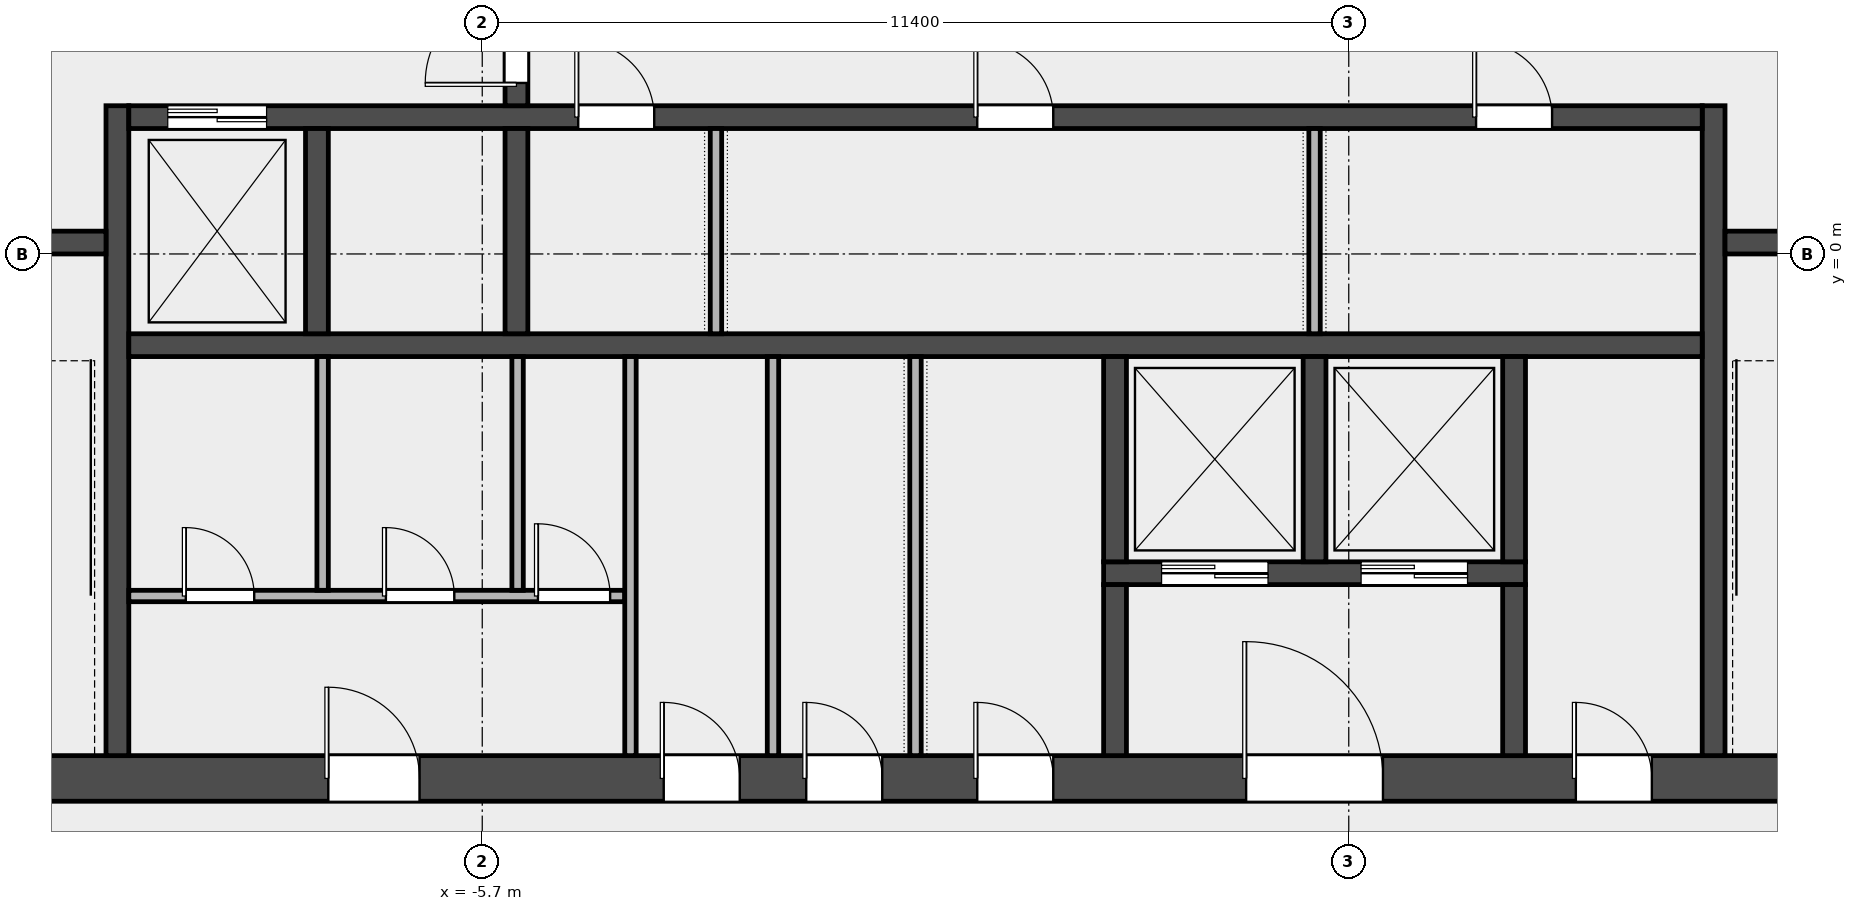
"""IFC4 building model, lengths in metres.
Left out: names, types, materials, properties, quantities, classifications, styles, units other than length and angle.
Written with IfcOpenShell. Run it as: python <this file> out.ifc"""

import sys

from ifc_helpers import new_model, si_unit, direction, frame, frame_2d, origin, place, context, subcontext, project, spatial, rectangle, extrude, element, fill, save


model = new_model("IFC4")
c1 = context("Model", 3, precision=1e-05, world=origin(), true_north=direction((0.0, 1.0)))
c2 = subcontext(c1, "Body", "Model", "MODEL_VIEW")
j1 = project(units=[si_unit("LENGTHUNIT", "METRE"), si_unit("PLANEANGLEUNIT", "RADIAN")], contexts=[c1])
p1 = place(None, origin())
s1 = spatial("IfcSite", under=j1, at=p1, CompositionType="ELEMENT")
p2 = place(p1, origin())
s2 = spatial("IfcBuilding", under=s1, at=p2, CompositionType="ELEMENT")
p3 = place(p2, frame((0.0, 0.0, 349.4)))
s3 = spatial("IfcBuildingStorey", under=s2, at=p3, CompositionType="ELEMENT", Elevation=349.4)
p4 = place(p3, frame((-14.4, -6.9, 0.0), z_axis=(0.0, 0.0, 1.0), x_axis=(1.0, 0.0, 0.0)))
e1 = element("IfcWall", 1, at=p4, inside=s3, PredefinedType="SHEAR", context=c2, shape_type="SweptSolid", body=[
    extrude(rectangle(XDim=28.8, YDim=0.6, at=frame_2d((14.4, 0.0))), origin(), (0.0, 0.0, 1.0), 3.7),
])
p5 = place(p4, frame((6.675, 0.0, 0.0)))
e2 = element("IfcOpeningElement", 2, at=p5, cuts=e1, PredefinedType="OPENING", context=c2, shape_type="SweptSolid", body=[
    extrude(rectangle(XDim=1.2, YDim=2.1, at=frame_2d((0.6, 1.05))), frame((0.0, 0.312, 0.0), z_axis=(0.0, -1.0, 0.0), x_axis=(1.0, 0.0, 0.0)), (0.0, 0.0, 1.0), 0.624),
])
p6 = place(p4, frame((11.087, 0.0, 0.0)))
e3 = element("IfcOpeningElement", 3, at=p6, cuts=e1, PredefinedType="OPENING", context=c2, shape_type="SweptSolid", body=[
    extrude(rectangle(XDim=1.0, YDim=2.1, at=frame_2d((0.5, 1.05))), frame((0.0, 0.312, 0.0), z_axis=(0.0, -1.0, 0.0), x_axis=(1.0, 0.0, 0.0)), (0.0, 0.0, 1.0), 0.624),
])
p7 = place(p4, frame((12.962, 0.0, 0.0)))
e4 = element("IfcOpeningElement", 4, at=p7, cuts=e1, PredefinedType="OPENING", context=c2, shape_type="SweptSolid", body=[
    extrude(rectangle(XDim=1.0, YDim=2.1, at=frame_2d((0.5, 1.05))), frame((0.0, 0.312, 0.0), z_axis=(0.0, -1.0, 0.0), x_axis=(1.0, 0.0, 0.0)), (0.0, 0.0, 1.0), 0.624),
])
p8 = place(p4, frame((15.212, 0.0, 0.0)))
e5 = element("IfcOpeningElement", 5, at=p8, cuts=e1, PredefinedType="OPENING", context=c2, shape_type="SweptSolid", body=[
    extrude(rectangle(XDim=1.0, YDim=2.1, at=frame_2d((0.5, 1.05))), frame((0.0, 0.312, 0.0), z_axis=(0.0, -1.0, 0.0), x_axis=(1.0, 0.0, 0.0)), (0.0, 0.0, 1.0), 0.624),
])
p9 = place(p4, frame((18.75, 0.0, 0.0)))
e6 = element("IfcOpeningElement", 6, at=p9, cuts=e1, PredefinedType="OPENING", context=c2, shape_type="SweptSolid", body=[
    extrude(rectangle(XDim=1.8, YDim=2.1, at=frame_2d((0.9, 1.05))), frame((0.0, 0.312, 0.0), z_axis=(0.0, -1.0, 0.0), x_axis=(1.0, 0.0, 0.0)), (0.0, 0.0, 1.0), 0.624),
])
p10 = place(p4, frame((23.087, 0.0, 0.0)))
e7 = element("IfcOpeningElement", 7, at=p10, cuts=e1, PredefinedType="OPENING", context=c2, shape_type="SweptSolid", body=[
    extrude(rectangle(XDim=1.0, YDim=2.1, at=frame_2d((0.5, 1.05))), frame((0.0, 0.312, 0.0), z_axis=(0.0, -1.0, 0.0), x_axis=(1.0, 0.0, 0.0)), (0.0, 0.0, 1.0), 0.624),
])
for number, where, z_axis, x_axis in (
    (8, (-10.5, -6.6, 0.0), (0.0, 0.0, 1.0), (0.0, 1.0, 0.0)),
    (9, (10.5, -6.6, 0.0), (0.0, 0.0, 1.0), (0.0, 1.0, 0.0)),
):
    element("IfcWall", number, at=place(p3, frame(where, z_axis=z_axis, x_axis=x_axis)), inside=s3, PredefinedType="SHEAR", context=c2, shape_type="SweptSolid", body=[
        extrude(rectangle(XDim=8.55, YDim=0.3, at=frame_2d((4.275, 0.0))), origin(), (0.0, 0.0, 1.0), 3.7),
    ])
p11 = place(p3, frame((-13.8, 0.15, 0.0), z_axis=(0.0, 0.0, 1.0), x_axis=(1.0, 0.0, 0.0)))
e10 = element("IfcWall", 10, at=p11, inside=s3, PredefinedType="SOLIDWALL", context=c2, shape_type="SweptSolid", body=[
    extrude(rectangle(XDim=3.15, YDim=0.3, at=frame_2d((1.575, 0.0))), origin(), (0.0, 0.0, 1.0), 3.7),
])
p12 = place(p11, frame((0.975, 0.0, 0.0)))
e11 = element("IfcOpeningElement", 11, at=p12, cuts=e10, PredefinedType="OPENING", context=c2, shape_type="SweptSolid", body=[
    extrude(rectangle(XDim=1.1, YDim=2.1, at=frame_2d((0.55, 1.05))), frame((0.0, 0.162, 0.0), z_axis=(0.0, -1.0, 0.0), x_axis=(1.0, 0.0, 0.0)), (0.0, 0.0, 1.0), 0.324),
])
p13 = place(p3, frame((10.65, 0.15, 0.0), z_axis=(0.0, 0.0, 1.0), x_axis=(1.0, 0.0, 0.0)))
e12 = element("IfcWall", 12, at=p13, inside=s3, PredefinedType="SOLIDWALL", context=c2, shape_type="SweptSolid", body=[
    extrude(rectangle(XDim=3.15, YDim=0.3, at=frame_2d((1.575, 0.0))), origin(), (0.0, 0.0, 1.0), 3.7),
])
p14 = place(p13, frame((1.025, 0.0, 0.0)))
e13 = element("IfcOpeningElement", 13, at=p14, cuts=e12, PredefinedType="OPENING", context=c2, shape_type="SweptSolid", body=[
    extrude(rectangle(XDim=1.1, YDim=2.1, at=frame_2d((0.55, 1.05))), frame((0.0, 0.162, 0.0), z_axis=(0.0, -1.0, 0.0), x_axis=(1.0, 0.0, 0.0)), (0.0, 0.0, 1.0), 0.324),
])
p15 = place(p3, frame((-10.35, -1.2, 0.0), z_axis=(0.0, 0.0, 1.0), x_axis=(1.0, 0.0, 0.0)))
e14 = element("IfcWall", 14, at=p15, inside=s3, PredefinedType="SOLIDWALL", context=c2, shape_type="SweptSolid", body=[
    extrude(rectangle(XDim=20.7, YDim=0.3, at=frame_2d((10.35, 0.0))), origin(), (0.0, 0.0, 1.0), 3.7),
])
p16 = place(p3, frame((-10.35, 1.8, 0.0), z_axis=(0.0, 0.0, 1.0), x_axis=(1.0, 0.0, 0.0)))
e15 = element("IfcWall", 15, at=p16, inside=s3, PredefinedType="SOLIDWALL", context=c2, shape_type="SweptSolid", body=[
    extrude(rectangle(XDim=20.7, YDim=0.3, at=frame_2d((10.35, 0.0))), origin(), (0.0, 0.0, 1.0), 3.7),
])
p17 = place(p16, frame((0.512, 0.0, 0.0)))
e16 = element("IfcOpeningElement", 16, at=p17, cuts=e15, PredefinedType="OPENING", context=c2, shape_type="SweptSolid", body=[
    extrude(rectangle(XDim=1.3, YDim=2.1, at=frame_2d((0.65, 1.05))), frame((0.0, 0.162, 0.0), z_axis=(0.0, -1.0, 0.0), x_axis=(1.0, 0.0, 0.0)), (0.0, 0.0, 1.0), 0.324),
])
p18 = place(p16, frame((5.913, 0.0, 0.0)))
e17 = element("IfcOpeningElement", 17, at=p18, cuts=e15, PredefinedType="OPENING", context=c2, shape_type="SweptSolid", body=[
    extrude(rectangle(XDim=1.0, YDim=2.1, at=frame_2d((0.5, 1.05))), frame((0.0, 0.162, 0.0), z_axis=(0.0, -1.0, 0.0), x_axis=(1.0, 0.0, 0.0)), (0.0, 0.0, 1.0), 0.324),
])
p19 = place(p16, frame((11.163, 0.0, 0.0)))
e18 = element("IfcOpeningElement", 18, at=p19, cuts=e15, PredefinedType="OPENING", context=c2, shape_type="SweptSolid", body=[
    extrude(rectangle(XDim=1.0, YDim=2.1, at=frame_2d((0.5, 1.05))), frame((0.0, 0.162, 0.0), z_axis=(0.0, -1.0, 0.0), x_axis=(1.0, 0.0, 0.0)), (0.0, 0.0, 1.0), 0.324),
])
p20 = place(p16, frame((17.725, 0.0, 0.0)))
e19 = element("IfcOpeningElement", 19, at=p20, cuts=e15, PredefinedType="OPENING", context=c2, shape_type="SweptSolid", body=[
    extrude(rectangle(XDim=1.0, YDim=2.1, at=frame_2d((0.5, 1.05))), frame((0.0, 0.162, 0.0), z_axis=(0.0, -1.0, 0.0), x_axis=(1.0, 0.0, 0.0)), (0.0, 0.0, 1.0), 0.324),
])
for number, where, z_axis, x_axis in (
    (20, (-7.875, -1.05, 0.0), (0.0, 0.0, 1.0), (0.0, 1.0, 0.0)),
    (21, (-5.25, -1.05, 0.0), (0.0, 0.0, 1.0), (0.0, 1.0, 0.0)),
):
    element("IfcWall", number, at=place(p3, frame(where, z_axis=z_axis, x_axis=x_axis)), inside=s3, PredefinedType="SOLIDWALL", context=c2, shape_type="SweptSolid", body=[
        extrude(rectangle(XDim=2.7, YDim=0.3, at=frame_2d((1.35, 0.0))), origin(), (0.0, 0.0, 1.0), 3.7),
    ])
p21 = place(p3, frame((-5.25, 1.95, 0.0), z_axis=(0.0, 0.0, 1.0), x_axis=(0.0, 1.0, 0.0)))
e22 = element("IfcWall", 22, at=p21, inside=s3, PredefinedType="SOLIDWALL", context=c2, shape_type="SweptSolid", body=[
    extrude(rectangle(XDim=3.3, YDim=0.3, at=frame_2d((1.65, 0.0))), origin(), (0.0, 0.0, 1.0), 3.7),
])
p22 = place(p21, frame((0.3, 0.0, 0.0)))
e23 = element("IfcOpeningElement", 23, at=p22, cuts=e22, PredefinedType="OPENING", context=c2, shape_type="SweptSolid", body=[
    extrude(rectangle(XDim=1.2, YDim=2.1, at=frame_2d((0.6, 1.05))), frame((0.0, 0.162, 0.0), z_axis=(0.0, -1.0, 0.0), x_axis=(1.0, 0.0, 0.0)), (0.0, 0.0, 1.0), 0.324),
])
p23 = place(p21, frame((1.8, 0.0, 0.0)))
e24 = element("IfcOpeningElement", 24, at=p23, cuts=e22, PredefinedType="OPENING", context=c2, shape_type="SweptSolid", body=[
    extrude(rectangle(XDim=1.2, YDim=2.1, at=frame_2d((0.6, 1.05))), frame((0.0, 0.162, 0.0), z_axis=(0.0, -1.0, 0.0), x_axis=(1.0, 0.0, 0.0)), (0.0, 0.0, 1.0), 0.324),
])
p24 = place(p3, frame((2.475, -4.2, 0.0), z_axis=(0.0, 0.0, 1.0), x_axis=(1.0, 0.0, 0.0)))
e25 = element("IfcWall", 25, at=p24, inside=s3, PredefinedType="SOLIDWALL", context=c2, shape_type="SweptSolid", body=[
    extrude(rectangle(XDim=5.55, YDim=0.3, at=frame_2d((2.775, 0.0))), origin(), (0.0, 0.0, 1.0), 3.7),
])
p25 = place(p24, frame((0.762, 0.0, 0.0)))
e26 = element("IfcOpeningElement", 26, at=p25, cuts=e25, PredefinedType="OPENING", context=c2, shape_type="SweptSolid", body=[
    extrude(rectangle(XDim=1.4, YDim=2.1, at=frame_2d((0.7, 1.05))), frame((0.0, 0.162, 0.0), z_axis=(0.0, -1.0, 0.0), x_axis=(1.0, 0.0, 0.0)), (0.0, 0.0, 1.0), 0.324),
])
p26 = place(p24, frame((3.387, 0.0, 0.0)))
e27 = element("IfcOpeningElement", 27, at=p26, cuts=e25, PredefinedType="OPENING", context=c2, shape_type="SweptSolid", body=[
    extrude(rectangle(XDim=1.4, YDim=2.1, at=frame_2d((0.7, 1.05))), frame((0.0, 0.162, 0.0), z_axis=(0.0, -1.0, 0.0), x_axis=(1.0, 0.0, 0.0)), (0.0, 0.0, 1.0), 0.324),
])
p27 = place(p3, frame((2.625, -4.05, 0.0), z_axis=(0.0, 0.0, 1.0), x_axis=(0.0, 1.0, 0.0)))
e28 = element("IfcWall", 28, at=p27, inside=s3, PredefinedType="SOLIDWALL", context=c2, shape_type="SweptSolid", body=[
    extrude(rectangle(XDim=2.7, YDim=0.3, at=frame_2d((1.35, 0.0))), origin(), (0.0, 0.0, 1.0), 3.7),
])
p28 = place(p3, frame((2.625, -6.6, 0.0), z_axis=(0.0, 0.0, 1.0), x_axis=(0.0, 1.0, 0.0)))
e29 = element("IfcWall", 29, at=p28, inside=s3, PredefinedType="SOLIDWALL", context=c2, shape_type="SweptSolid", body=[
    extrude(rectangle(XDim=2.25, YDim=0.3, at=frame_2d((1.125, 0.0))), origin(), (0.0, 0.0, 1.0), 3.7),
])
for number, where, z_axis, x_axis in (
    (30, (5.25, -4.05, 0.0), (0.0, 0.0, 1.0), (0.0, 1.0, 0.0)),
    (31, (7.875, -4.05, 0.0), (0.0, 0.0, 1.0), (0.0, 1.0, 0.0)),
):
    element("IfcWall", number, at=place(p3, frame(where, z_axis=z_axis, x_axis=x_axis)), inside=s3, PredefinedType="SOLIDWALL", context=c2, shape_type="SweptSolid", body=[
        extrude(rectangle(XDim=2.7, YDim=0.3, at=frame_2d((1.35, 0.0))), origin(), (0.0, 0.0, 1.0), 3.7),
    ])
p29 = place(p3, frame((7.875, -6.6, 0.0), z_axis=(0.0, 0.0, 1.0), x_axis=(0.0, 1.0, 0.0)))
e32 = element("IfcWall", 32, at=p29, inside=s3, PredefinedType="SOLIDWALL", context=c2, shape_type="SweptSolid", body=[
    extrude(rectangle(XDim=2.25, YDim=0.3, at=frame_2d((1.125, 0.0))), origin(), (0.0, 0.0, 1.0), 3.7),
])
p30 = place(p3, frame((-10.35, -4.5, 0.0), z_axis=(0.0, 0.0, 1.0), x_axis=(1.0, 0.0, 0.0)))
e33 = element("IfcWall", 33, at=p30, inside=s3, PredefinedType="PARTITIONING", context=c2, shape_type="SweptSolid", body=[
    extrude(rectangle(XDim=6.525, YDim=0.15, at=frame_2d((3.263, 0.0))), origin(), (0.0, 0.0, 1.0), 3.7),
])
p31 = place(p30, frame((0.75, 0.0, 0.0)))
e34 = element("IfcOpeningElement", 34, at=p31, cuts=e33, PredefinedType="OPENING", context=c2, shape_type="SweptSolid", body=[
    extrude(rectangle(XDim=0.9, YDim=2.1, at=frame_2d((0.45, 1.05))), frame((0.0, 0.087, 0.0), z_axis=(0.0, -1.0, 0.0), x_axis=(1.0, 0.0, 0.0)), (0.0, 0.0, 1.0), 0.174),
])
p32 = place(p30, frame((3.383, 0.0, 0.0)))
e35 = element("IfcOpeningElement", 35, at=p32, cuts=e33, PredefinedType="OPENING", context=c2, shape_type="SweptSolid", body=[
    extrude(rectangle(XDim=0.9, YDim=2.1, at=frame_2d((0.45, 1.05))), frame((0.0, 0.087, 0.0), z_axis=(0.0, -1.0, 0.0), x_axis=(1.0, 0.0, 0.0)), (0.0, 0.0, 1.0), 0.174),
])
p33 = place(p30, frame((5.383, 0.0, 0.0)))
e36 = element("IfcOpeningElement", 36, at=p33, cuts=e33, PredefinedType="OPENING", context=c2, shape_type="SweptSolid", body=[
    extrude(rectangle(XDim=0.95, YDim=2.1, at=frame_2d((0.475, 1.05))), frame((0.0, 0.087, 0.0), z_axis=(0.0, -1.0, 0.0), x_axis=(1.0, 0.0, 0.0)), (0.0, 0.0, 1.0), 0.174),
])
for number, where, z_axis, x_axis in (
    (37, (-7.8, -4.425, 0.0), (0.0, 0.0, 1.0), (0.0, 1.0, 0.0)),
    (38, (-5.235, -4.425, 0.0), (0.0, 0.0, 1.0), (0.0, 1.0, 0.0)),
):
    element("IfcWall", number, at=place(p3, frame(where, z_axis=z_axis, x_axis=x_axis)), inside=s3, PredefinedType="PARTITIONING", context=c2, shape_type="SweptSolid", body=[
        extrude(rectangle(XDim=3.075, YDim=0.15, at=frame_2d((1.538, 0.0))), origin(), (0.0, 0.0, 1.0), 3.7),
    ])
for number, where, z_axis, x_axis in (
    (39, (-3.75, -6.6, 0.0), (0.0, 0.0, 1.0), (0.0, 1.0, 0.0)),
    (40, (-1.875, -6.6, 0.0), (0.0, 0.0, 1.0), (0.0, 1.0, 0.0)),
    (41, (0.0, -6.6, 0.0), (0.0, 0.0, 1.0), (0.0, 1.0, 0.0)),
):
    element("IfcWall", number, at=place(p3, frame(where, z_axis=z_axis, x_axis=x_axis)), inside=s3, PredefinedType="PARTITIONING", context=c2, shape_type="SweptSolid", body=[
        extrude(rectangle(XDim=5.25, YDim=0.15, at=frame_2d((2.625, 0.0))), origin(), (0.0, 0.0, 1.0), 3.7),
    ])
for number, where, z_axis, x_axis in (
    (42, (-2.625, -1.05, 0.0), (0.0, 0.0, 1.0), (0.0, 1.0, 0.0)),
    (43, (5.25, -1.05, 0.0), (0.0, 0.0, 1.0), (0.0, 1.0, 0.0)),
):
    element("IfcWall", number, at=place(p3, frame(where, z_axis=z_axis, x_axis=x_axis)), inside=s3, PredefinedType="PARTITIONING", context=c2, shape_type="SweptSolid", body=[
        extrude(rectangle(XDim=2.7, YDim=0.15, at=frame_2d((1.35, 0.0))), origin(), (0.0, 0.0, 1.0), 3.7),
    ])
p34 = place(p22, origin())
e44 = element("IfcDoor", 44, at=p34, inside=s3, OperationType="SINGLE_SWING_LEFT", PredefinedType="DOOR", context=c2, shape_type="SweptSolid", body=[
    extrude(rectangle(XDim=1.2, YDim=2.1, at=frame_2d((0.6, 1.05))), frame((0.0, 0.025, 0.0), z_axis=(0.0, -1.0, 0.0), x_axis=(1.0, 0.0, 0.0)), (0.0, 0.0, 1.0), 0.05),
])
fill(e23, e44)
p35 = place(p17, origin())
e45 = element("IfcDoor", 45, at=p35, inside=s3, OperationType="DOUBLE_DOOR_SLIDING", PredefinedType="DOOR", context=c2, shape_type="SweptSolid", body=[
    extrude(rectangle(XDim=1.3, YDim=2.1, at=frame_2d((0.65, 1.05))), frame((0.0, 0.025, 0.0), z_axis=(0.0, -1.0, 0.0), x_axis=(1.0, 0.0, 0.0)), (0.0, 0.0, 1.0), 0.05),
])
fill(e16, e45)
p36 = place(p25, origin())
e46 = element("IfcDoor", 46, at=p36, inside=s3, OperationType="DOUBLE_DOOR_SLIDING", PredefinedType="DOOR", context=c2, shape_type="SweptSolid", body=[
    extrude(rectangle(XDim=1.4, YDim=2.1, at=frame_2d((0.7, 1.05))), frame((0.0, 0.025, 0.0), z_axis=(0.0, -1.0, 0.0), x_axis=(1.0, 0.0, 0.0)), (0.0, 0.0, 1.0), 0.05),
])
fill(e26, e46)
p37 = place(p26, origin())
e47 = element("IfcDoor", 47, at=p37, inside=s3, OperationType="DOUBLE_DOOR_SLIDING", PredefinedType="DOOR", context=c2, shape_type="SweptSolid", body=[
    extrude(rectangle(XDim=1.4, YDim=2.1, at=frame_2d((0.7, 1.05))), frame((0.0, 0.025, 0.0), z_axis=(0.0, -1.0, 0.0), x_axis=(1.0, 0.0, 0.0)), (0.0, 0.0, 1.0), 0.05),
])
fill(e27, e47)
p38 = place(p5, origin())
e48 = element("IfcDoor", 48, at=p38, inside=s3, OperationType="SINGLE_SWING_LEFT", PredefinedType="DOOR", context=c2, shape_type="SweptSolid", body=[
    extrude(rectangle(XDim=1.2, YDim=2.1, at=frame_2d((0.6, 1.05))), frame((0.0, 0.025, 0.0), z_axis=(0.0, -1.0, 0.0), x_axis=(1.0, 0.0, 0.0)), (0.0, 0.0, 1.0), 0.05),
])
fill(e2, e48)
p39 = place(p31, origin())
e49 = element("IfcDoor", 49, at=p39, inside=s3, OperationType="SINGLE_SWING_LEFT", PredefinedType="DOOR", context=c2, shape_type="SweptSolid", body=[
    extrude(rectangle(XDim=0.9, YDim=2.1, at=frame_2d((0.45, 1.05))), frame((0.0, 0.025, 0.0), z_axis=(0.0, -1.0, 0.0), x_axis=(1.0, 0.0, 0.0)), (0.0, 0.0, 1.0), 0.05),
])
fill(e34, e49)
p40 = place(p32, origin())
e50 = element("IfcDoor", 50, at=p40, inside=s3, OperationType="SINGLE_SWING_LEFT", PredefinedType="DOOR", context=c2, shape_type="SweptSolid", body=[
    extrude(rectangle(XDim=0.9, YDim=2.1, at=frame_2d((0.45, 1.05))), frame((0.0, 0.025, 0.0), z_axis=(0.0, -1.0, 0.0), x_axis=(1.0, 0.0, 0.0)), (0.0, 0.0, 1.0), 0.05),
])
fill(e35, e50)
p41 = place(p33, origin())
e51 = element("IfcDoor", 51, at=p41, inside=s3, OperationType="SINGLE_SWING_LEFT", PredefinedType="DOOR", context=c2, shape_type="SweptSolid", body=[
    extrude(rectangle(XDim=0.95, YDim=2.1, at=frame_2d((0.475, 1.05))), frame((0.0, 0.025, 0.0), z_axis=(0.0, -1.0, 0.0), x_axis=(1.0, 0.0, 0.0)), (0.0, 0.0, 1.0), 0.05),
])
fill(e36, e51)
p42 = place(p6, origin())
e52 = element("IfcDoor", 52, at=p42, inside=s3, OperationType="SINGLE_SWING_LEFT", PredefinedType="DOOR", context=c2, shape_type="SweptSolid", body=[
    extrude(rectangle(XDim=1.0, YDim=2.1, at=frame_2d((0.5, 1.05))), frame((0.0, 0.025, 0.0), z_axis=(0.0, -1.0, 0.0), x_axis=(1.0, 0.0, 0.0)), (0.0, 0.0, 1.0), 0.05),
])
fill(e3, e52)
p43 = place(p7, origin())
e53 = element("IfcDoor", 53, at=p43, inside=s3, OperationType="SINGLE_SWING_LEFT", PredefinedType="DOOR", context=c2, shape_type="SweptSolid", body=[
    extrude(rectangle(XDim=1.0, YDim=2.1, at=frame_2d((0.5, 1.05))), frame((0.0, 0.025, 0.0), z_axis=(0.0, -1.0, 0.0), x_axis=(1.0, 0.0, 0.0)), (0.0, 0.0, 1.0), 0.05),
])
fill(e4, e53)
p44 = place(p8, origin())
e54 = element("IfcDoor", 54, at=p44, inside=s3, OperationType="SINGLE_SWING_LEFT", PredefinedType="DOOR", context=c2, shape_type="SweptSolid", body=[
    extrude(rectangle(XDim=1.0, YDim=2.1, at=frame_2d((0.5, 1.05))), frame((0.0, 0.025, 0.0), z_axis=(0.0, -1.0, 0.0), x_axis=(1.0, 0.0, 0.0)), (0.0, 0.0, 1.0), 0.05),
])
fill(e5, e54)
p45 = place(p9, origin())
e55 = element("IfcDoor", 55, at=p45, inside=s3, OperationType="DOUBLE_DOOR_SINGLE_SWING", PredefinedType="DOOR", context=c2, shape_type="SweptSolid", body=[
    extrude(rectangle(XDim=1.8, YDim=2.1, at=frame_2d((0.9, 1.05))), frame((0.0, 0.025, 0.0), z_axis=(0.0, -1.0, 0.0), x_axis=(1.0, 0.0, 0.0)), (0.0, 0.0, 1.0), 0.05),
])
fill(e6, e55)
p46 = place(p10, origin())
e56 = element("IfcDoor", 56, at=p46, inside=s3, OperationType="SINGLE_SWING_LEFT", PredefinedType="DOOR", context=c2, shape_type="SweptSolid", body=[
    extrude(rectangle(XDim=1.0, YDim=2.1, at=frame_2d((0.5, 1.05))), frame((0.0, 0.025, 0.0), z_axis=(0.0, -1.0, 0.0), x_axis=(1.0, 0.0, 0.0)), (0.0, 0.0, 1.0), 0.05),
])
fill(e7, e56)
p47 = place(p18, origin())
e57 = element("IfcDoor", 57, at=p47, inside=s3, OperationType="SINGLE_SWING_LEFT", PredefinedType="DOOR", context=c2, shape_type="SweptSolid", body=[
    extrude(rectangle(XDim=1.0, YDim=2.1, at=frame_2d((0.5, 1.05))), frame((0.0, 0.025, 0.0), z_axis=(0.0, -1.0, 0.0), x_axis=(1.0, 0.0, 0.0)), (0.0, 0.0, 1.0), 0.05),
])
fill(e17, e57)
p48 = place(p19, origin())
e58 = element("IfcDoor", 58, at=p48, inside=s3, OperationType="SINGLE_SWING_LEFT", PredefinedType="DOOR", context=c2, shape_type="SweptSolid", body=[
    extrude(rectangle(XDim=1.0, YDim=2.1, at=frame_2d((0.5, 1.05))), frame((0.0, 0.025, 0.0), z_axis=(0.0, -1.0, 0.0), x_axis=(1.0, 0.0, 0.0)), (0.0, 0.0, 1.0), 0.05),
])
fill(e18, e58)
p49 = place(p20, origin())
e59 = element("IfcDoor", 59, at=p49, inside=s3, OperationType="SINGLE_SWING_LEFT", PredefinedType="DOOR", context=c2, shape_type="SweptSolid", body=[
    extrude(rectangle(XDim=1.0, YDim=2.1, at=frame_2d((0.5, 1.05))), frame((0.0, 0.025, 0.0), z_axis=(0.0, -1.0, 0.0), x_axis=(1.0, 0.0, 0.0)), (0.0, 0.0, 1.0), 0.05),
])
fill(e19, e59)
save(model, sys.argv[1])
